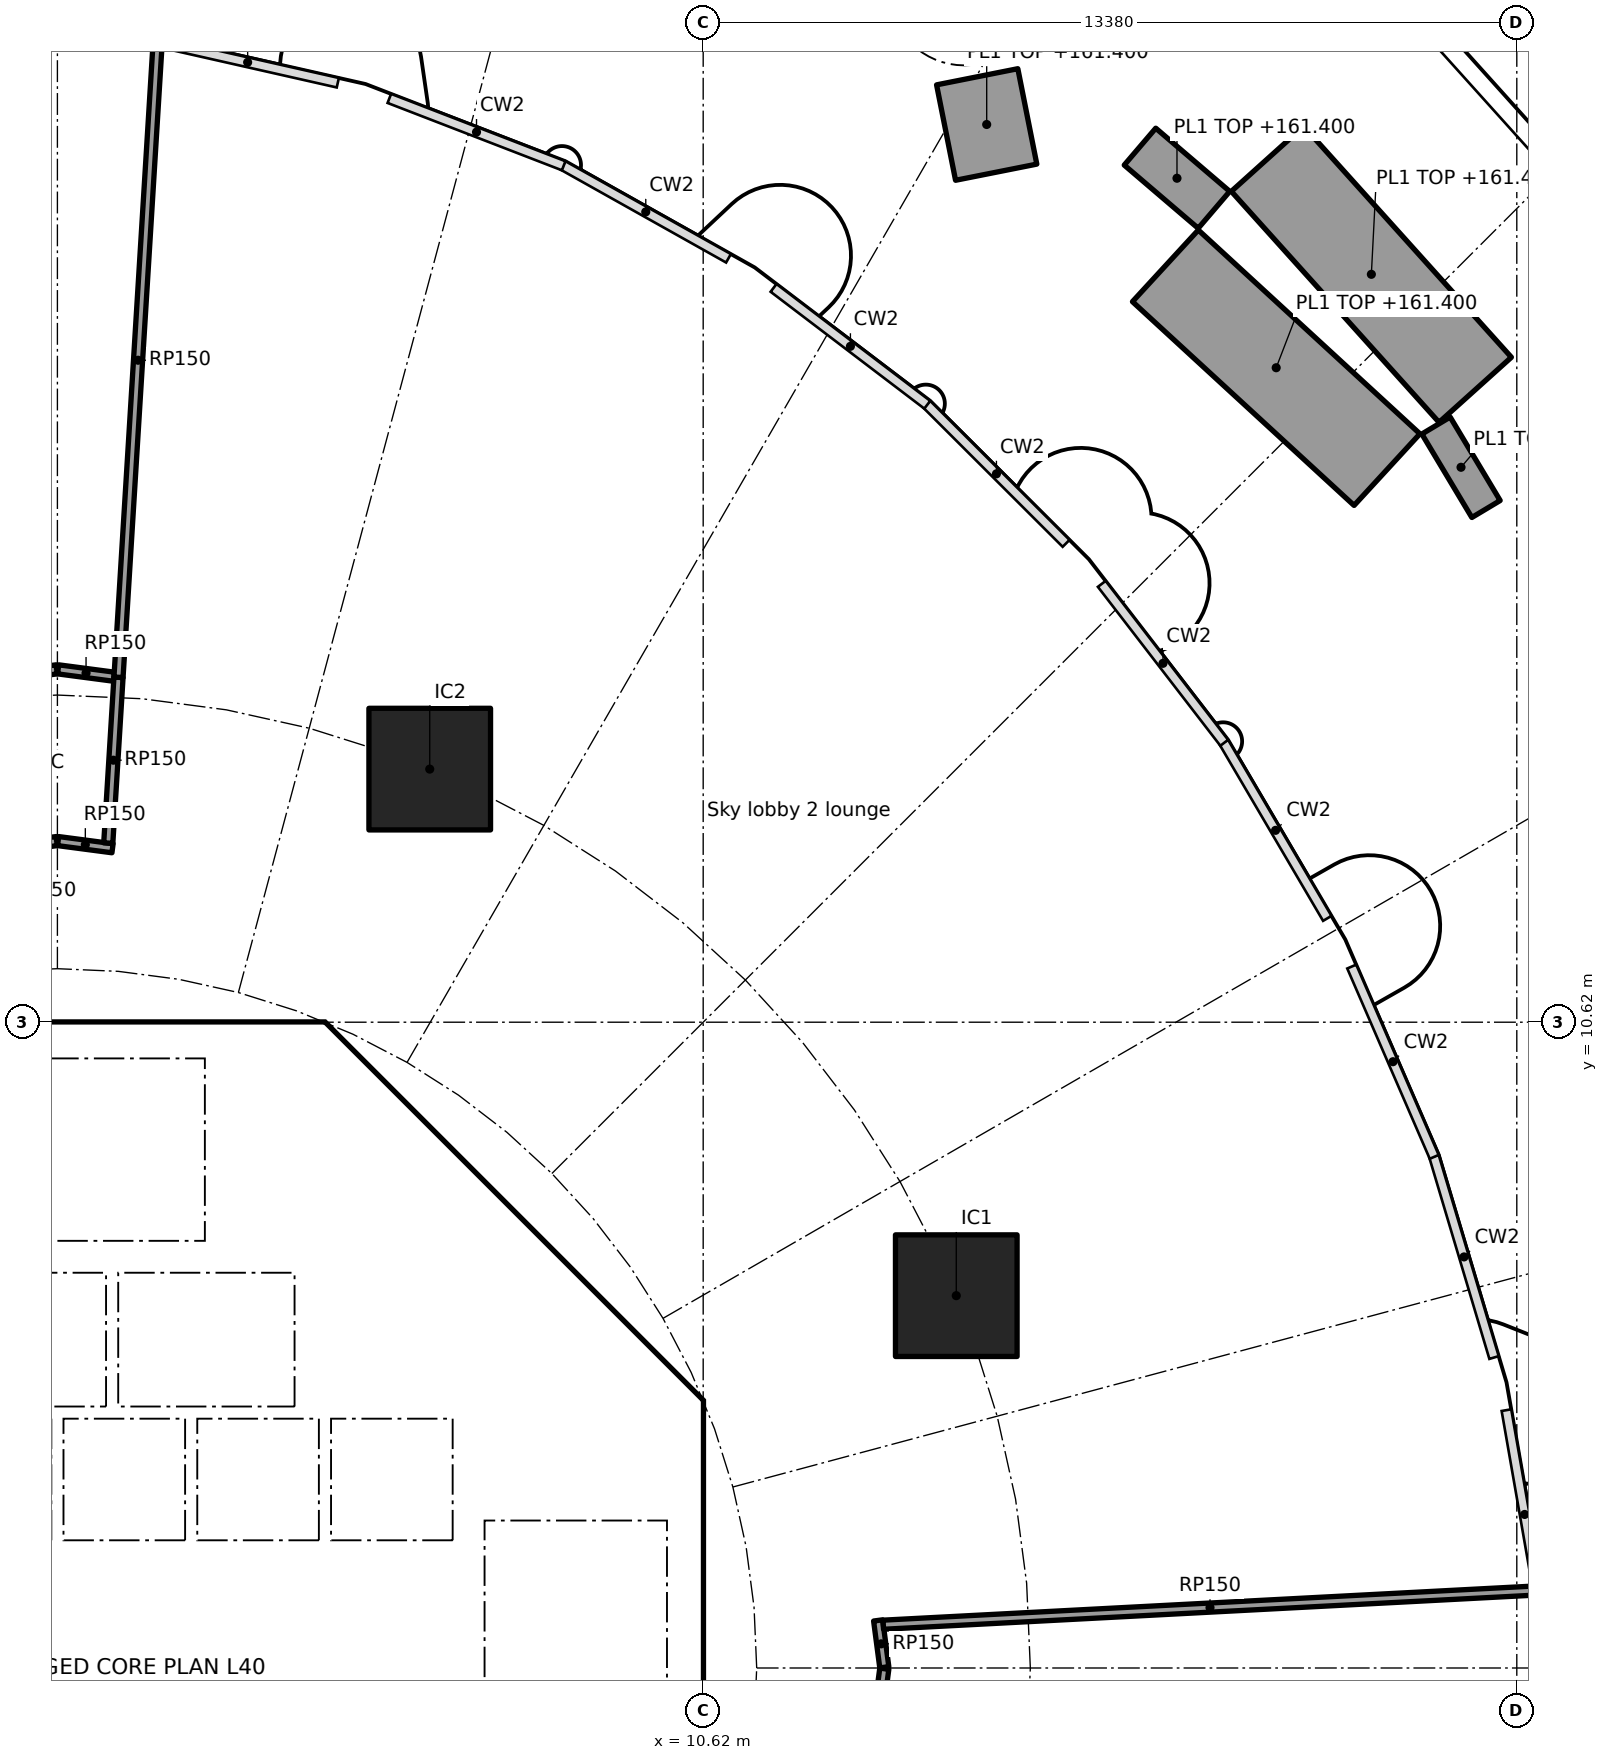
"""IFC4 building model, lengths in metres.
Left out: names, types, materials, properties, quantities, classifications, styles, units other than length and angle.
Written with IfcOpenShell. Run it as: python <this file> out.ifc"""

import sys

from ifc_helpers import new_model, si_unit, direction, frame, frame_2d, origin, origin_2d, place, context, subcontext, project, spatial, polyline, rectangle, outline, extrude, element, fill, save


model = new_model("IFC4")
c1 = context("Model", 3, precision=1e-05, world=origin(), true_north=direction((0.0, 1.0)))
c2 = subcontext(c1, "Body", "Model", "MODEL_VIEW")
j1 = project(units=[si_unit("LENGTHUNIT", "METRE"), si_unit("PLANEANGLEUNIT", "RADIAN")], contexts=[c1])
p1 = place(None, origin())
s1 = spatial("IfcSite", under=j1, at=p1, CompositionType="ELEMENT")
p2 = place(p1, origin())
s2 = spatial("IfcBuilding", under=s1, at=p2, CompositionType="ELEMENT")
p3 = place(p2, frame((0.0, 0.0, 160.3)))
s3 = spatial("IfcBuildingStorey", under=s2, at=p3, CompositionType="ELEMENT", Elevation=160.3)
for number, where, z_axis, x_axis in (
    (1, (14.782, 6.123, 0.0), (0.0, 0.0, 1.0), (1.0, 0.0, 0.0)),
    (2, (6.123, 14.782, 0.0), (0.0, 0.0, 1.0), (1.0, 0.0, 0.0)),
):
    element("IfcColumn", number, at=place(p3, frame(where, z_axis=z_axis, x_axis=x_axis)), inside=s3, PredefinedType="COLUMN", context=c2, shape_type="SweptSolid", body=[
        extrude(rectangle(XDim=2.0, YDim=2.0, at=origin_2d()), origin(), (0.0, 0.0, 1.0), 5.6),
    ])
p4 = place(p3, frame((14.614, 25.25, 0.0), z_axis=(0.0, 0.0, 1.0), x_axis=(0.980807472968, 0.194978719274, 0.0)))
e3 = element("IfcWall", 3, at=p4, inside=s3, PredefinedType="SOLIDWALL", context=c2, shape_type="SweptSolid", body=[
    extrude(rectangle(XDim=1.362, YDim=1.6, at=frame_2d((0.681, 0.0))), origin(), (0.0, 0.0, 1.0), 1.1),
])
p5 = place(p3, frame((18.152, 24.196, 0.0), z_axis=(0.0, 0.0, 1.0), x_axis=(0.649581622908, 0.76029186184, 0.0)))
e4 = element("IfcWall", 4, at=p5, inside=s3, PredefinedType="SOLIDWALL", context=c2, shape_type="SweptSolid", body=[
    extrude(rectangle(XDim=0.798, YDim=1.6, at=frame_2d((0.399, 0.0))), origin(), (0.0, 0.0, 1.0), 1.1),
])
p6 = place(p3, frame((19.9, 24.818, 0.0), z_axis=(0.0, 0.0, 1.0), x_axis=(0.668695366774, -0.743536486297, 0.0)))
e5 = element("IfcWall", 5, at=p6, inside=s3, PredefinedType="SOLIDWALL", context=c2, shape_type="SweptSolid", body=[
    extrude(rectangle(XDim=5.108, YDim=1.6, at=frame_2d((2.554, 0.0))), origin(), (0.0, 0.0, 1.0), 1.1),
])
p7 = place(p3, frame((21.865, 19.707, 0.0), z_axis=(0.0, 0.0, 1.0), x_axis=(-0.736097079127, 0.676875978375, 0.0)))
e6 = element("IfcWall", 6, at=p7, inside=s3, PredefinedType="SOLIDWALL", context=c2, shape_type="SweptSolid", body=[
    extrude(rectangle(XDim=4.951, YDim=1.6, at=frame_2d((2.476, 0.0))), origin(), (0.0, 0.0, 1.0), 1.1),
])
p8 = place(p3, frame((23.315, 19.885, 0.0), z_axis=(0.0, 0.0, 1.0), x_axis=(-0.857730952834, -0.51409883539, 0.0)))
e7 = element("IfcWall", 7, at=p8, inside=s3, PredefinedType="SOLIDWALL", context=c2, shape_type="SweptSolid", body=[
    extrude(rectangle(XDim=0.543, YDim=1.6, at=frame_2d((0.271, 0.0))), origin(), (0.0, 0.0, 1.0), 1.1),
])
p9 = place(p3, frame((9.988, 4.613, 0.0), z_axis=(0.0, 0.0, 1.0), x_axis=(-0.707106781187, 0.707106781187, 0.0)))
e8 = element("IfcWall", 8, at=p9, inside=s3, PredefinedType="SHEAR", context=c2, shape_type="SweptSolid", body=[
    extrude(rectangle(XDim=7.602, YDim=0.6, at=frame_2d((3.801, 0.0))), origin(), (0.0, 0.0, 1.0), 5.34),
])
p10 = place(p9, frame((3.201, 0.0, 0.0)))
e9 = element("IfcOpeningElement", 9, at=p10, cuts=e8, PredefinedType="OPENING", context=c2, shape_type="SweptSolid", body=[
    extrude(rectangle(XDim=1.2, YDim=2.1, at=frame_2d((0.6, 1.05))), frame((0.0, 0.31, 0.0), z_axis=(0.0, -1.0, 0.0), x_axis=(1.0, 0.0, 0.0)), (0.0, 0.0, 1.0), 0.62),
])
p11 = place(p3, frame((4.0, 4.3, 0.0), z_axis=(0.0, 0.0, 1.0), x_axis=(0.0, 1.0, 0.0)))
e10 = element("IfcWall", 10, at=p11, inside=s3, PredefinedType="SOLIDWALL", context=c2, shape_type="SweptSolid", body=[
    extrude(rectangle(XDim=2.2, YDim=0.2, at=frame_2d((1.1, 0.0))), origin(), (0.0, 0.0, 1.0), 5.34),
])
p12 = place(p11, frame((0.55, 0.0, 0.0)))
e11 = element("IfcOpeningElement", 11, at=p12, cuts=e10, PredefinedType="OPENING", context=c2, shape_type="SweptSolid", body=[
    extrude(rectangle(XDim=1.1, YDim=2.1, at=frame_2d((0.55, 1.05))), frame((0.0, 0.11, 0.0), z_axis=(0.0, -1.0, 0.0), x_axis=(1.0, 0.0, 0.0)), (0.0, 0.0, 1.0), 0.22),
])
p13 = place(p3, frame((-6.7, 2.0, 0.0), z_axis=(0.0, 0.0, 1.0), x_axis=(1.0, 0.0, 0.0)))
e12 = element("IfcWall", 12, at=p13, inside=s3, PredefinedType="SOLIDWALL", context=c2, shape_type="SweptSolid", body=[
    extrude(rectangle(XDim=13.4, YDim=0.2, at=frame_2d((6.7, 0.0))), origin(), (0.0, 0.0, 1.0), 5.34),
])
p14 = place(p13, frame((0.65, 0.0, 0.0)))
e13 = element("IfcOpeningElement", 13, at=p14, cuts=e12, PredefinedType="OPENING", context=c2, shape_type="SweptSolid", body=[
    extrude(rectangle(XDim=1.1, YDim=2.1, at=frame_2d((0.55, 1.05))), frame((0.0, 0.11, 0.0), z_axis=(0.0, -1.0, 0.0), x_axis=(1.0, 0.0, 0.0)), (0.0, 0.0, 1.0), 0.22),
])
p15 = place(p13, frame((2.85, 0.0, 0.0)))
e14 = element("IfcOpeningElement", 14, at=p15, cuts=e12, PredefinedType="OPENING", context=c2, shape_type="SweptSolid", body=[
    extrude(rectangle(XDim=1.1, YDim=2.1, at=frame_2d((0.55, 1.05))), frame((0.0, 0.11, 0.0), z_axis=(0.0, -1.0, 0.0), x_axis=(1.0, 0.0, 0.0)), (0.0, 0.0, 1.0), 0.22),
])
p16 = place(p13, frame((5.05, 0.0, 0.0)))
e15 = element("IfcOpeningElement", 15, at=p16, cuts=e12, PredefinedType="OPENING", context=c2, shape_type="SweptSolid", body=[
    extrude(rectangle(XDim=1.1, YDim=2.1, at=frame_2d((0.55, 1.05))), frame((0.0, 0.11, 0.0), z_axis=(0.0, -1.0, 0.0), x_axis=(1.0, 0.0, 0.0)), (0.0, 0.0, 1.0), 0.22),
])
p17 = place(p13, frame((7.25, 0.0, 0.0)))
e16 = element("IfcOpeningElement", 16, at=p17, cuts=e12, PredefinedType="OPENING", context=c2, shape_type="SweptSolid", body=[
    extrude(rectangle(XDim=1.1, YDim=2.1, at=frame_2d((0.55, 1.05))), frame((0.0, 0.11, 0.0), z_axis=(0.0, -1.0, 0.0), x_axis=(1.0, 0.0, 0.0)), (0.0, 0.0, 1.0), 0.22),
])
p18 = place(p13, frame((9.45, 0.0, 0.0)))
e17 = element("IfcOpeningElement", 17, at=p18, cuts=e12, PredefinedType="OPENING", context=c2, shape_type="SweptSolid", body=[
    extrude(rectangle(XDim=1.1, YDim=2.1, at=frame_2d((0.55, 1.05))), frame((0.0, 0.11, 0.0), z_axis=(0.0, -1.0, 0.0), x_axis=(1.0, 0.0, 0.0)), (0.0, 0.0, 1.0), 0.22),
])
p19 = place(p3, frame((6.7, 4.0, 0.0), z_axis=(0.0, 0.0, 1.0), x_axis=(1.0, 0.0, 0.0)))
e18 = element("IfcWall", 18, at=p19, inside=s3, PredefinedType="SOLIDWALL", context=c2, shape_type="SweptSolid", body=[
    extrude(rectangle(XDim=3.325, YDim=0.2, at=frame_2d((1.662, 0.0))), origin(), (0.0, 0.0, 1.0), 5.34),
])
p20 = place(p19, frame((1.25, 0.0, 0.0)))
e19 = element("IfcOpeningElement", 19, at=p20, cuts=e18, PredefinedType="OPENING", context=c2, shape_type="SweptSolid", body=[
    extrude(rectangle(XDim=1.1, YDim=2.1, at=frame_2d((0.55, 1.05))), frame((0.0, 0.11, 0.0), z_axis=(0.0, -1.0, 0.0), x_axis=(1.0, 0.0, 0.0)), (0.0, 0.0, 1.0), 0.22),
])
p21 = place(p3, frame((4.0, 7.025, 0.0), z_axis=(0.0, 0.0, 1.0), x_axis=(0.0, 1.0, 0.0)))
e20 = element("IfcWall", 20, at=p21, inside=s3, PredefinedType="SOLIDWALL", context=c2, shape_type="SweptSolid", body=[
    extrude(rectangle(XDim=3.0, YDim=0.2, at=frame_2d((1.5, 0.0))), origin(), (0.0, 0.0, 1.0), 5.34),
])
p22 = place(p21, frame((0.925, 0.0, 0.0)))
e21 = element("IfcOpeningElement", 21, at=p22, cuts=e20, PredefinedType="OPENING", context=c2, shape_type="SweptSolid", body=[
    extrude(rectangle(XDim=1.1, YDim=2.1, at=frame_2d((0.55, 1.05))), frame((0.0, 0.11, 0.0), z_axis=(0.0, -1.0, 0.0), x_axis=(1.0, 0.0, 0.0)), (0.0, 0.0, 1.0), 0.22),
])
p23 = place(p3, origin())
e22 = element("IfcWall", 22, at=p23, inside=s3, PredefinedType="SHEAR", context=c2, shape_type="SweptSolid", body=[
    extrude(outline(polyline([(-4.152, 10.025), (-4.401, 9.776), (-4.825, 10.2), (-4.401, 10.625), (4.401, 10.625), (4.825, 10.2), (4.401, 9.776), (4.152, 10.025), (-4.152, 10.025)])), origin(), (0.0, 0.0, 1.0), 5.34),
])
p24 = place(p3, origin())
e23 = element("IfcWall", 23, at=p24, inside=s3, PredefinedType="SHEAR", context=c2, shape_type="SweptSolid", body=[
    extrude(outline(polyline([(9.776, -4.401), (10.025, -4.152), (10.025, -3.801), (10.025, 4.152), (9.776, 4.401), (10.2, 4.825), (10.625, 4.401), (10.625, -4.401), (10.2, -4.825), (9.776, -4.401)])), origin(), (0.0, 0.0, 1.0), 5.34),
])
p25 = place(p3, frame((0.9, 4.3, 0.0), z_axis=(0.0, 0.0, 1.0), x_axis=(0.0, 1.0, 0.0)))
e24 = element("IfcWall", 24, at=p25, inside=s3, PredefinedType="SOLIDWALL", context=c2, shape_type="SweptSolid", body=[
    extrude(rectangle(XDim=2.2, YDim=0.2, at=frame_2d((1.1, 0.0))), origin(), (0.0, 0.0, 1.0), 5.34),
])
p26 = place(p3, origin())
e25 = element("IfcWall", 25, at=p26, inside=s3, PredefinedType="SOLIDWALL", context=c2, shape_type="SweptSolid", body=[
    extrude(outline(polyline([(-6.5, 2.1), (-6.7, 2.1), (-6.7, 4.3), (6.7, 4.3), (6.7, 2.1), (6.5, 2.1), (6.5, 4.1), (4.5, 4.1), (4.5, 2.1), (4.3, 2.1), (4.3, 4.1), (2.3, 4.1), (2.3, 2.1), (2.1, 2.1), (2.1, 4.1), (0.1, 4.1), (0.1, 2.1), (-0.1, 2.1), (-0.1, 4.1), (-2.1, 4.1), (-2.1, 2.1), (-2.3, 2.1), (-2.3, 4.1), (-4.3, 4.1), (-4.3, 2.1), (-4.5, 2.1), (-4.5, 4.1), (-6.5, 4.1), (-6.5, 2.1)])), origin(), (0.0, 0.0, 1.0), 5.34),
])
p27 = place(p3, origin())
e26 = element("IfcWall", 26, at=p27, inside=s3, PredefinedType="SOLIDWALL", context=c2, shape_type="SweptSolid", body=[
    extrude(outline(polyline([(4.1, 6.5), (-4.1, 6.5), (-4.1, 7.025), (4.1, 7.025), (4.1, 6.5)])), origin(), (0.0, 0.0, 1.0), 5.34),
])
p28 = place(p3, origin())
e27 = element("IfcWall", 27, at=p28, inside=s3, PredefinedType="SOLIDWALL", context=c2, shape_type="SweptSolid", body=[
    extrude(outline(polyline([(7.025, -3.9), (6.7, -3.9), (6.7, 3.9), (7.025, 3.9), (7.025, -3.9)])), origin(), (0.0, 0.0, 1.0), 5.34),
])
p29 = place(p3, frame((-3.236, 15.998, 0.0), z_axis=(0.0, 0.0, 1.0), x_axis=(0.991450717699, 0.130481701299, 0.0)))
e28 = element("IfcWall", 28, at=p29, inside=s3, PredefinedType="PARTITIONING", context=c2, shape_type="SweptSolid", body=[
    extrude(rectangle(XDim=3.252, YDim=0.15, at=frame_2d((1.626, 0.0))), origin(), (0.0, 0.0, 1.0), 5.34),
])
p30 = place(p3, frame((-2.618, 13.255, 0.0), z_axis=(0.0, 0.0, 1.0), x_axis=(0.991449553099, 0.13049055008, 0.0)))
e29 = element("IfcWall", 29, at=p30, inside=s3, PredefinedType="PARTITIONING", context=c2, shape_type="SweptSolid", body=[
    extrude(rectangle(XDim=2.629, YDim=0.15, at=frame_2d((1.314, 0.0))), origin(), (0.0, 0.0, 1.0), 5.34),
])
p31 = place(p30, frame((0.87, 0.0, 0.0)))
e30 = element("IfcOpeningElement", 30, at=p31, cuts=e29, PredefinedType="OPENING", context=c2, shape_type="SweptSolid", body=[
    extrude(rectangle(XDim=0.9, YDim=2.1, at=frame_2d((0.45, 1.05))), frame((0.0, 0.085, 0.0), z_axis=(0.0, -1.0, 0.0), x_axis=(1.0, 0.0, 0.0)), (0.0, 0.0, 1.0), 0.17),
])
p32 = place(p3, frame((0.012, 13.598, 0.0), z_axis=(0.0, 0.0, 1.0), x_axis=(0.991462580461, -0.130391531728, 0.0)))
e31 = element("IfcWall", 31, at=p32, inside=s3, PredefinedType="PARTITIONING", context=c2, shape_type="SweptSolid", body=[
    extrude(rectangle(XDim=0.903, YDim=0.15, at=frame_2d((0.451, 0.0))), origin(), (0.0, 0.0, 1.0), 5.34),
])
p33 = place(p3, frame((0.012, 16.423, 0.0), z_axis=(0.0, 0.0, 1.0), x_axis=(0.991454295543, -0.130454512571, 0.0)))
e32 = element("IfcWall", 32, at=p33, inside=s3, PredefinedType="PARTITIONING", context=c2, shape_type="SweptSolid", body=[
    extrude(rectangle(XDim=0.926, YDim=0.15, at=frame_2d((0.463, 0.0))), origin(), (0.0, 0.0, 1.0), 5.34),
])
p34 = place(p3, frame((0.837, 13.565, 0.0), z_axis=(0.0, 0.0, 1.0), x_axis=(0.061577051156, 0.998102332815, 0.0)))
e33 = element("IfcWall", 33, at=p34, inside=s3, PredefinedType="PARTITIONING", context=c2, shape_type="SweptSolid", body=[
    extrude(rectangle(XDim=2.732, YDim=0.15, at=frame_2d((1.366, 0.0))), origin(), (0.0, 0.0, 1.0), 5.34),
])
p35 = place(p3, frame((1.005, 16.292, 0.0), z_axis=(0.0, 0.0, 1.0), x_axis=(0.061550484882, 0.998103971443, 0.0)))
e34 = element("IfcWall", 34, at=p35, inside=s3, PredefinedType="PARTITIONING", context=c2, shape_type="SweptSolid", body=[
    extrude(rectangle(XDim=10.448, YDim=0.15, at=frame_2d((5.224, 0.0))), origin(), (0.0, 0.0, 1.0), 5.34),
])
p36 = place(p3, frame((13.497, 0.782, 0.0), z_axis=(0.0, 0.0, 1.0), x_axis=(0.130332652421, -0.991470322154, 0.0)))
e35 = element("IfcWall", 35, at=p36, inside=s3, PredefinedType="PARTITIONING", context=c2, shape_type="SweptSolid", body=[
    extrude(rectangle(XDim=0.777, YDim=0.15, at=frame_2d((0.389, 0.0))), origin(), (0.0, 0.0, 1.0), 5.34),
])
p37 = place(p3, frame((13.598, -0.012, 0.0), z_axis=(0.0, 0.0, 1.0), x_axis=(-0.130499283623, -0.991448403586, 0.0)))
e36 = element("IfcWall", 36, at=p37, inside=s3, PredefinedType="PARTITIONING", context=c2, shape_type="SweptSolid", body=[
    extrude(rectangle(XDim=3.527, YDim=0.15, at=frame_2d((1.763, 0.0))), origin(), (0.0, 0.0, 1.0), 5.34),
])
p38 = place(p3, frame((24.328, 1.275, 0.0), z_axis=(0.0, 0.0, 1.0), x_axis=(-0.998630336248, -0.052320660594, 0.0)))
e37 = element("IfcWall", 37, at=p38, inside=s3, PredefinedType="PARTITIONING", context=c2, shape_type="SweptSolid", body=[
    extrude(rectangle(XDim=10.76, YDim=0.15, at=frame_2d((5.38, 0.0))), origin(), (0.0, 0.0, 1.0), 5.34),
])
p39 = place(p17, origin())
e38 = element("IfcDoor", 38, at=p39, inside=s3, OperationType="DOUBLE_DOOR_SLIDING", PredefinedType="DOOR", context=c2, shape_type="SweptSolid", body=[
    extrude(rectangle(XDim=1.1, YDim=2.1, at=frame_2d((0.55, 1.05))), frame((0.0, 0.025, 0.0), z_axis=(0.0, -1.0, 0.0), x_axis=(1.0, 0.0, 0.0)), (0.0, 0.0, 1.0), 0.05),
])
fill(e16, e38)
p40 = place(p18, origin())
e39 = element("IfcDoor", 39, at=p40, inside=s3, OperationType="DOUBLE_DOOR_SLIDING", PredefinedType="DOOR", context=c2, shape_type="SweptSolid", body=[
    extrude(rectangle(XDim=1.1, YDim=2.1, at=frame_2d((0.55, 1.05))), frame((0.0, 0.025, 0.0), z_axis=(0.0, -1.0, 0.0), x_axis=(1.0, 0.0, 0.0)), (0.0, 0.0, 1.0), 0.05),
])
fill(e17, e39)
p41 = place(p12, origin())
e40 = element("IfcDoor", 40, at=p41, inside=s3, OperationType="DOUBLE_DOOR_SLIDING", PredefinedType="DOOR", context=c2, shape_type="SweptSolid", body=[
    extrude(rectangle(XDim=1.1, YDim=2.1, at=frame_2d((0.55, 1.05))), frame((0.0, 0.025, 0.0), z_axis=(0.0, -1.0, 0.0), x_axis=(1.0, 0.0, 0.0)), (0.0, 0.0, 1.0), 0.05),
])
fill(e11, e40)
p42 = place(p20, frame((1.1, 0.0, 0.0), x_axis=(-1.0, 0.0, 0.0)))
e41 = element("IfcDoor", 41, at=p42, inside=s3, OperationType="SINGLE_SWING_LEFT", PredefinedType="DOOR", context=c2, shape_type="SweptSolid", body=[
    extrude(rectangle(XDim=1.1, YDim=2.1, at=frame_2d((0.55, 1.05))), frame((0.0, 0.025, 0.0), z_axis=(0.0, -1.0, 0.0), x_axis=(1.0, 0.0, 0.0)), (0.0, 0.0, 1.0), 0.05),
])
fill(e19, e41)
p43 = place(p22, origin())
e42 = element("IfcDoor", 42, at=p43, inside=s3, OperationType="SINGLE_SWING_RIGHT", PredefinedType="DOOR", context=c2, shape_type="SweptSolid", body=[
    extrude(rectangle(XDim=1.1, YDim=2.1, at=frame_2d((0.55, 1.05))), frame((0.0, 0.025, 0.0), z_axis=(0.0, -1.0, 0.0), x_axis=(1.0, 0.0, 0.0)), (0.0, 0.0, 1.0), 0.05),
])
fill(e21, e42)
p44 = place(p10, origin())
e43 = element("IfcDoor", 43, at=p44, inside=s3, OperationType="SINGLE_SWING_LEFT", PredefinedType="DOOR", context=c2, shape_type="SweptSolid", body=[
    extrude(rectangle(XDim=1.2, YDim=2.1, at=frame_2d((0.6, 1.05))), frame((0.0, 0.025, 0.0), z_axis=(0.0, -1.0, 0.0), x_axis=(1.0, 0.0, 0.0)), (0.0, 0.0, 1.0), 0.05),
])
fill(e9, e43)
save(model, sys.argv[1])
